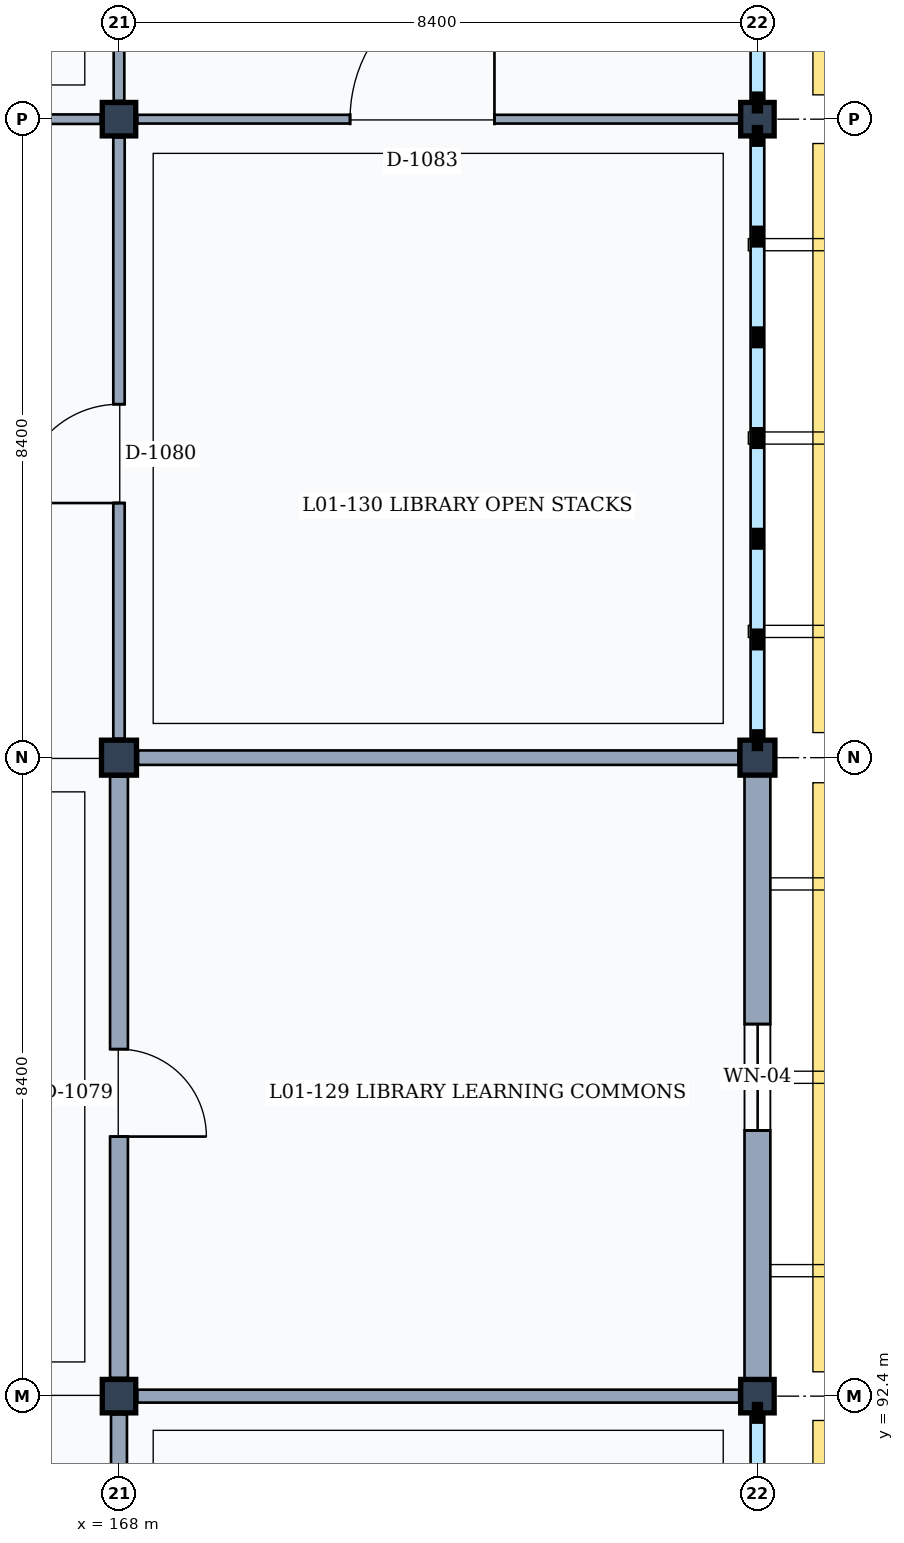
"""IFC4 building model, lengths in metres.
Left out: names, types, materials, properties, quantities, classifications, styles, units other than length and angle.
Written with IfcOpenShell. Run it as: python <this file> out.ifc"""

import sys

from ifc_helpers import new_model, si_unit, direction, frame, frame_2d, origin, origin_2d, place, context, subcontext, project, spatial, rectangle, extrude, element, fill, save


model = new_model("IFC4")
c1 = context("Model", 3, precision=1e-05, world=origin(), true_north=direction((0.0, 1.0)))
c2 = subcontext(c1, "Body", "Model", "MODEL_VIEW")
j1 = project(units=[si_unit("LENGTHUNIT", "METRE"), si_unit("PLANEANGLEUNIT", "RADIAN")], contexts=[c1])
p1 = place(None, origin())
s1 = spatial("IfcSite", under=j1, at=p1, CompositionType="ELEMENT")
p2 = place(p1, origin())
s2 = spatial("IfcBuilding", under=s1, at=p2, CompositionType="ELEMENT")
p3 = place(p2, frame((0.0, 0.0, 4.8)))
s3 = spatial("IfcBuildingStorey", under=s2, at=p3, CompositionType="ELEMENT", Elevation=4.8)
p4 = place(p3, frame((168.0, 92.4, 0.0), z_axis=(0.0, 0.0, 1.0), x_axis=(1.0, 0.0, 0.0)))
e1 = element("IfcColumn", 1, at=p4, inside=s3, PredefinedType="COLUMN", context=c2, shape_type="SweptSolid", body=[
    extrude(rectangle(XDim=0.44, YDim=0.44, at=origin_2d()), origin(), (0.0, 0.0, 1.0), 4.8),
])
p5 = place(p3, frame((168.0, 100.8, 0.0), z_axis=(0.0, 0.0, 1.0), x_axis=(1.0, 0.0, 0.0)))
e2 = element("IfcColumn", 2, at=p5, inside=s3, PredefinedType="COLUMN", context=c2, shape_type="SweptSolid", body=[
    extrude(rectangle(XDim=0.46, YDim=0.46, at=origin_2d()), origin(), (0.0, 0.0, 1.0), 4.8),
])
for number, where, z_axis, x_axis in (
    (3, (168.0, 109.2, 0.0), (0.0, 0.0, 1.0), (1.0, 0.0, 0.0)),
    (4, (176.4, 92.4, 0.0), (0.0, 0.0, 1.0), (1.0, 0.0, 0.0)),
):
    element("IfcColumn", number, at=place(p3, frame(where, z_axis=z_axis, x_axis=x_axis)), inside=s3, PredefinedType="COLUMN", context=c2, shape_type="SweptSolid", body=[
        extrude(rectangle(XDim=0.44, YDim=0.44, at=origin_2d()), origin(), (0.0, 0.0, 1.0), 4.8),
    ])
p6 = place(p3, frame((176.4, 100.8, 0.0), z_axis=(0.0, 0.0, 1.0), x_axis=(1.0, 0.0, 0.0)))
e5 = element("IfcColumn", 5, at=p6, inside=s3, PredefinedType="COLUMN", context=c2, shape_type="SweptSolid", body=[
    extrude(rectangle(XDim=0.46, YDim=0.46, at=origin_2d()), origin(), (0.0, 0.0, 1.0), 4.8),
])
p7 = place(p3, frame((176.4, 109.2, 0.0), z_axis=(0.0, 0.0, 1.0), x_axis=(1.0, 0.0, 0.0)))
e6 = element("IfcColumn", 6, at=p7, inside=s3, PredefinedType="COLUMN", context=c2, shape_type="SweptSolid", body=[
    extrude(rectangle(XDim=0.44, YDim=0.44, at=origin_2d()), origin(), (0.0, 0.0, 1.0), 4.8),
])
p8 = place(p3, frame((176.4, 100.57, 0.0), z_axis=(0.0, 0.0, 1.0), x_axis=(0.0, -1.0, 0.0)))
e7 = element("IfcWall", 7, at=p8, inside=s3, PredefinedType="SOLIDWALL", context=c2, shape_type="SweptSolid", body=[
    extrude(rectangle(XDim=7.95, YDim=0.34, at=frame_2d((3.975, 0.0))), origin(), (0.0, 0.0, 1.0), 3.96),
])
p9 = place(p8, frame((3.275, 0.0, 0.9)))
e8 = element("IfcOpeningElement", 8, at=p9, cuts=e7, PredefinedType="OPENING", context=c2, shape_type="SweptSolid", body=[
    extrude(rectangle(XDim=1.4, YDim=2.1, at=frame_2d((0.7, 1.05))), frame((0.0, 0.18, 0.0), z_axis=(0.0, -1.0, 0.0), x_axis=(1.0, 0.0, 0.0)), (0.0, 0.0, 1.0), 0.36),
])
p10 = place(p3, frame((168.0, 84.25, 0.0), z_axis=(0.0, 0.0, 1.0), x_axis=(0.0, 1.0, 0.0)))
e9 = element("IfcWall", 9, at=p10, inside=s3, PredefinedType="PARTITIONING", context=c2, shape_type="SweptSolid", body=[
    extrude(rectangle(XDim=7.91, YDim=0.21, at=frame_2d((3.955, 0.0))), origin(), (0.0, 0.0, 1.0), 3.92),
])
p11 = place(p10, frame((3.225, 0.0, 0.0)))
e10 = element("IfcOpeningElement", 10, at=p11, cuts=e9, PredefinedType="OPENING", context=c2, shape_type="SweptSolid", body=[
    extrude(rectangle(XDim=1.05, YDim=2.2, at=frame_2d((0.525, 1.1))), frame((0.0, 0.115, 0.0), z_axis=(0.0, -1.0, 0.0), x_axis=(1.0, 0.0, 0.0)), (0.0, 0.0, 1.0), 0.23),
])
p12 = place(p3, frame((168.0, 92.64, 0.0), z_axis=(0.0, 0.0, 1.0), x_axis=(0.0, 1.0, 0.0)))
e11 = element("IfcWall", 11, at=p12, inside=s3, PredefinedType="PARTITIONING", context=c2, shape_type="SweptSolid", body=[
    extrude(rectangle(XDim=7.91, YDim=0.235, at=frame_2d((3.955, 0.0))), origin(), (0.0, 0.0, 1.0), 3.92),
])
p13 = place(p12, frame((3.175, 0.0, 0.0)))
e12 = element("IfcOpeningElement", 12, at=p13, cuts=e11, PredefinedType="OPENING", context=c2, shape_type="SweptSolid", body=[
    extrude(rectangle(XDim=1.15, YDim=2.25, at=frame_2d((0.575, 1.125))), frame((0.0, 0.127, 0.0), z_axis=(0.0, -1.0, 0.0), x_axis=(1.0, 0.0, 0.0)), (0.0, 0.0, 1.0), 0.255),
])
p14 = place(p3, frame((168.0, 101.05, 0.0), z_axis=(0.0, 0.0, 1.0), x_axis=(0.0, 1.0, 0.0)))
e13 = element("IfcWall", 13, at=p14, inside=s3, PredefinedType="PARTITIONING", context=c2, shape_type="SweptSolid", body=[
    extrude(rectangle(XDim=7.91, YDim=0.15, at=frame_2d((3.955, 0.0))), origin(), (0.0, 0.0, 1.0), 3.92),
])
p15 = place(p14, frame((3.1, 0.0, 0.0)))
e14 = element("IfcOpeningElement", 14, at=p15, cuts=e13, PredefinedType="OPENING", context=c2, shape_type="SweptSolid", body=[
    extrude(rectangle(XDim=1.3, YDim=2.2, at=frame_2d((0.65, 1.1))), frame((0.0, 0.085, 0.0), z_axis=(0.0, -1.0, 0.0), x_axis=(1.0, 0.0, 0.0)), (0.0, 0.0, 1.0), 0.17),
])
p16 = place(p3, frame((159.84, 109.2, 0.0), z_axis=(0.0, 0.0, 1.0), x_axis=(1.0, 0.0, 0.0)))
e15 = element("IfcWall", 15, at=p16, inside=s3, PredefinedType="PARTITIONING", context=c2, shape_type="SweptSolid", body=[
    extrude(rectangle(XDim=7.92, YDim=0.125, at=frame_2d((3.96, 0.0))), origin(), (0.0, 0.0, 1.0), 3.92),
])
p17 = place(p16, frame((2.975, 0.0, 0.0)))
e16 = element("IfcOpeningElement", 16, at=p17, cuts=e15, PredefinedType="OPENING", context=c2, shape_type="SweptSolid", body=[
    extrude(rectangle(XDim=1.55, YDim=2.35, at=frame_2d((0.775, 1.175))), frame((0.0, 0.073, 0.0), z_axis=(0.0, -1.0, 0.0), x_axis=(1.0, 0.0, 0.0)), (0.0, 0.0, 1.0), 0.145),
])
p18 = place(p3, frame((168.0, 109.44, 0.0), z_axis=(0.0, 0.0, 1.0), x_axis=(0.0, 1.0, 0.0)))
e17 = element("IfcWall", 17, at=p18, inside=s3, PredefinedType="PARTITIONING", context=c2, shape_type="SweptSolid", body=[
    extrude(rectangle(XDim=7.91, YDim=0.14, at=frame_2d((3.955, 0.0))), origin(), (0.0, 0.0, 1.0), 3.92),
])
p19 = place(p3, frame((168.24, 92.4, 0.0), z_axis=(0.0, 0.0, 1.0), x_axis=(1.0, 0.0, 0.0)))
e18 = element("IfcWall", 18, at=p19, inside=s3, PredefinedType="PARTITIONING", context=c2, shape_type="SweptSolid", body=[
    extrude(rectangle(XDim=7.92, YDim=0.17, at=frame_2d((3.96, 0.0))), origin(), (0.0, 0.0, 1.0), 3.92),
])
p20 = place(p3, frame((168.25, 100.8, 0.0), z_axis=(0.0, 0.0, 1.0), x_axis=(1.0, 0.0, 0.0)))
e19 = element("IfcWall", 19, at=p20, inside=s3, PredefinedType="PARTITIONING", context=c2, shape_type="SweptSolid", body=[
    extrude(rectangle(XDim=7.9, YDim=0.19, at=frame_2d((3.95, 0.0))), origin(), (0.0, 0.0, 1.0), 3.92),
])
p21 = place(p3, frame((168.24, 109.2, 0.0), z_axis=(0.0, 0.0, 1.0), x_axis=(1.0, 0.0, 0.0)))
e20 = element("IfcWall", 20, at=p21, inside=s3, PredefinedType="PARTITIONING", context=c2, shape_type="SweptSolid", body=[
    extrude(rectangle(XDim=7.92, YDim=0.115, at=frame_2d((3.96, 0.0))), origin(), (0.0, 0.0, 1.0), 3.92),
])
p22 = place(p21, frame((2.8, 0.0, 0.0)))
e21 = element("IfcOpeningElement", 21, at=p22, cuts=e20, PredefinedType="OPENING", context=c2, shape_type="SweptSolid", body=[
    extrude(rectangle(XDim=1.9, YDim=2.4, at=frame_2d((0.95, 1.2))), frame((0.0, 0.067, 0.0), z_axis=(0.0, -1.0, 0.0), x_axis=(1.0, 0.0, 0.0)), (0.0, 0.0, 1.0), 0.135),
])
p23 = place(p9, origin())
e22 = element("IfcWindow", 22, at=p23, inside=s3, PartitioningType="SINGLE_PANEL", PredefinedType="WINDOW", context=c2, shape_type="SweptSolid", body=[
    extrude(rectangle(XDim=1.4, YDim=2.1, at=frame_2d((0.7, 1.05))), frame((0.0, 0.03, 0.0), z_axis=(0.0, -1.0, 0.0), x_axis=(1.0, 0.0, 0.0)), (0.0, 0.0, 1.0), 0.06),
])
fill(e8, e22)
p24 = place(p13, frame((1.15, 0.0, 0.0), z_axis=(0.0, 0.0, 1.0), x_axis=(-1.0, 0.0, 0.0)))
e23 = element("IfcDoor", 23, at=p24, inside=s3, OperationType="SINGLE_SWING_RIGHT", PredefinedType="DOOR", context=c2, shape_type="SweptSolid", body=[
    extrude(rectangle(XDim=1.15, YDim=2.25, at=frame_2d((0.575, 1.125))), frame((0.0, 0.025, 0.0), z_axis=(0.0, -1.0, 0.0), x_axis=(1.0, 0.0, 0.0)), (0.0, 0.0, 1.0), 0.05),
])
fill(e12, e23)
p25 = place(p15, origin())
e24 = element("IfcDoor", 24, at=p25, inside=s3, OperationType="SINGLE_SWING_LEFT", PredefinedType="DOOR", context=c2, shape_type="SweptSolid", body=[
    extrude(rectangle(XDim=1.3, YDim=2.2, at=frame_2d((0.65, 1.1))), frame((0.0, 0.025, 0.0), z_axis=(0.0, -1.0, 0.0), x_axis=(1.0, 0.0, 0.0)), (0.0, 0.0, 1.0), 0.05),
])
fill(e14, e24)
p26 = place(p22, origin())
e25 = element("IfcDoor", 25, at=p26, inside=s3, OperationType="SINGLE_SWING_RIGHT", PredefinedType="DOOR", context=c2, shape_type="SweptSolid", body=[
    extrude(rectangle(XDim=1.9, YDim=2.4, at=frame_2d((0.95, 1.2))), frame((0.0, 0.025, 0.0), z_axis=(0.0, -1.0, 0.0), x_axis=(1.0, 0.0, 0.0)), (0.0, 0.0, 1.0), 0.05),
])
fill(e21, e25)
save(model, sys.argv[1])
